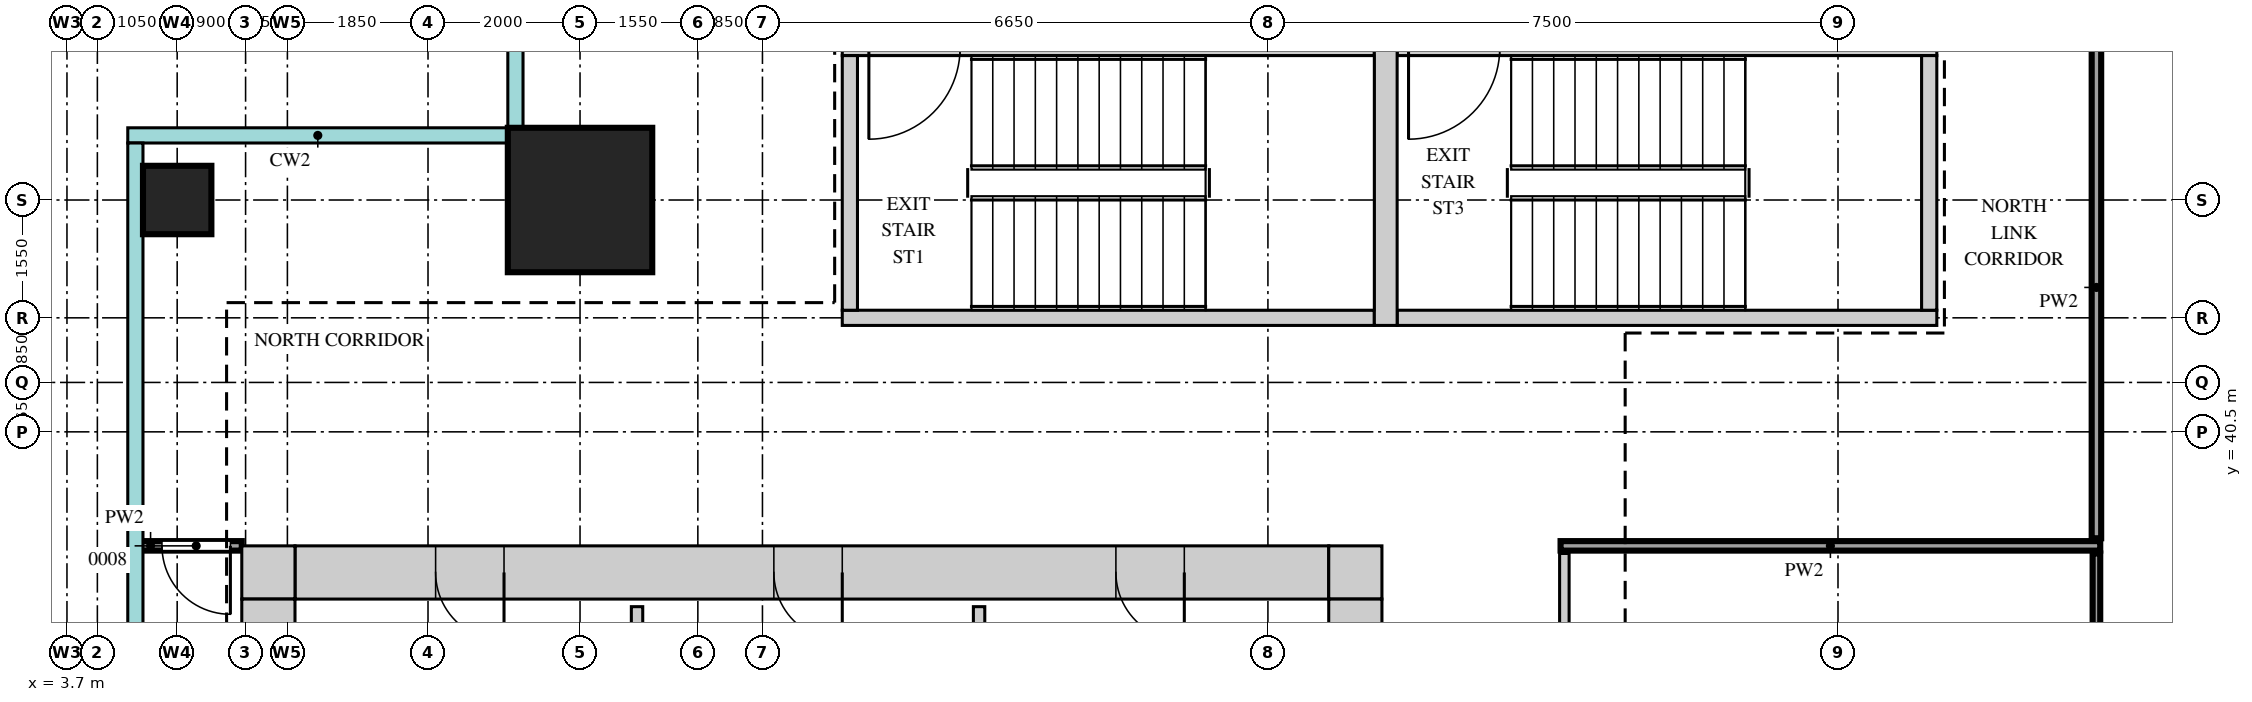
"""IFC4 building model, lengths in metres.
Left out: names, types, materials, properties, quantities, classifications, styles, units other than length and angle.
Written with IfcOpenShell. Run it as: python <this file> out.ifc"""

import sys

from ifc_helpers import new_model, si_unit, direction, frame, frame_2d, origin, origin_2d, place, context, subcontext, project, spatial, rectangle, extrude, source, transform, mapped, element, fill, save


model = new_model("IFC4")
c1 = context("Model", 3, precision=1e-05, world=origin(), true_north=direction((0.0, 1.0)))
c2 = subcontext(c1, "Body", "Model", "MODEL_VIEW")
j1 = project(units=[si_unit("LENGTHUNIT", "METRE"), si_unit("PLANEANGLEUNIT", "RADIAN")], contexts=[c1])
p1 = place(None, origin())
s1 = spatial("IfcSite", under=j1, at=p1, CompositionType="ELEMENT")
p2 = place(p1, origin())
s2 = spatial("IfcBuilding", under=s1, at=p2, CompositionType="ELEMENT")
p3 = place(p2, frame((0.0, 0.0, 238.2)))
s3 = spatial("IfcBuildingStorey", under=s2, at=p3, CompositionType="ELEMENT", Elevation=238.2)
m1 = source(origin(), c2, "Body", "SweptSolid", [
    extrude(rectangle(XDim=13.6, YDim=0.7, at=frame_2d((6.8, 0.0))), origin(), (0.0, 0.0, 1.0), 3.75),
])
p4 = place(p3, frame((6.7, 38.65, 0.0), z_axis=(0.0, 0.0, 1.0), x_axis=(1.0, 0.0, 0.0)))
e1 = element("IfcWall", 1, at=p4, inside=s3, PredefinedType="SHEAR", context=c2, shape_type="MappedRepresentation", body=[
    mapped(m1, transform((0.0, 0.0, 0.0))),
])
m2 = source(origin(), c2, "Body", "SweptSolid", [
    extrude(rectangle(XDim=0.9, YDim=2.1, at=frame_2d((0.45, 1.05))), frame((0.0, 0.36, 0.0), z_axis=(0.0, -1.0, 0.0), x_axis=(1.0, 0.0, 0.0)), (0.0, 0.0, 1.0), 0.72),
])
p5 = place(p4, frame((1.85, 0.0, 0.0)))
e2 = element("IfcOpeningElement", 2, at=p5, cuts=e1, PredefinedType="OPENING", context=c2, shape_type="MappedRepresentation", body=[
    mapped(m2, transform((0.0, 0.0, 0.0))),
])
p6 = place(p4, frame((6.3, 0.0, 0.0)))
e3 = element("IfcOpeningElement", 3, at=p6, cuts=e1, PredefinedType="OPENING", context=c2, shape_type="MappedRepresentation", body=[
    mapped(m2, transform((0.0, 0.0, 0.0))),
])
p7 = place(p4, frame((10.8, 0.0, 0.0)))
e4 = element("IfcOpeningElement", 4, at=p7, cuts=e1, PredefinedType="OPENING", context=c2, shape_type="MappedRepresentation", body=[
    mapped(m2, transform((0.0, 0.0, 0.0))),
])
m3 = source(origin(), c2, "Body", "SweptSolid", [
    extrude(rectangle(XDim=0.7, YDim=0.7, at=frame_2d((0.35, 0.0))), origin(), (0.0, 0.0, 1.0), 3.75),
])
for number, where, z_axis, x_axis in (
    (5, (20.3, 38.65, 0.0), (0.0, 0.0, 1.0), (1.0, 0.0, 0.0)),
    (6, (6.0, 38.65, 0.0), (0.0, 0.0, 1.0), (1.0, 0.0, 0.0)),
):
    element("IfcWall", number, at=place(p3, frame(where, z_axis=z_axis, x_axis=x_axis)), inside=s3, PredefinedType="SHEAR", context=c2, shape_type="MappedRepresentation", body=[
        mapped(m3, transform((0.0, 0.0, 0.0))),
    ])
m4 = source(origin(), c2, "Body", "SweptSolid", [
    extrude(rectangle(XDim=22.6, YDim=0.7, at=frame_2d((11.3, 0.0))), origin(), (0.0, 0.0, 1.0), 3.75),
])
p8 = place(p3, frame((20.65, 15.7, 0.0), z_axis=(0.0, 0.0, 1.0), x_axis=(0.0, 1.0, 0.0)))
e7 = element("IfcWall", 7, at=p8, inside=s3, PredefinedType="SHEAR", context=c2, shape_type="MappedRepresentation", body=[
    mapped(m4, transform((0.0, 0.0, 0.0))),
])
m5 = source(origin(), c2, "Body", "SweptSolid", [
    extrude(rectangle(XDim=1.8, YDim=2.1, at=frame_2d((0.9, 1.05))), frame((0.0, 0.36, 0.0), z_axis=(0.0, -1.0, 0.0), x_axis=(1.0, 0.0, 0.0)), (0.0, 0.0, 1.0), 0.72),
])
p9 = place(p8, frame((10.8, 0.0, 0.0)))
e8 = element("IfcOpeningElement", 8, at=p9, cuts=e7, PredefinedType="OPENING", context=c2, shape_type="MappedRepresentation", body=[
    mapped(m5, transform((0.0, 0.0, 0.0))),
])
p10 = place(p8, frame((0.45, 0.0, 0.0)))
e9 = element("IfcOpeningElement", 9, at=p10, cuts=e7, PredefinedType="OPENING", context=c2, shape_type="MappedRepresentation", body=[
    mapped(m2, transform((0.0, 0.0, 0.0))),
])
m6 = source(origin(), c2, "Body", "SweptSolid", [
    extrude(rectangle(XDim=1.0, YDim=2.1, at=frame_2d((0.5, 1.05))), frame((0.0, 0.36, 0.0), z_axis=(0.0, -1.0, 0.0), x_axis=(1.0, 0.0, 0.0)), (0.0, 0.0, 1.0), 0.72),
])
p11 = place(p8, frame((2.2, 0.0, 0.0)))
e10 = element("IfcOpeningElement", 10, at=p11, cuts=e7, PredefinedType="OPENING", context=c2, shape_type="MappedRepresentation", body=[
    mapped(m6, transform((0.0, 0.0, 0.0))),
])
p12 = place(p8, frame((5.0, 0.0, 0.0)))
e11 = element("IfcOpeningElement", 11, at=p12, cuts=e7, PredefinedType="OPENING", context=c2, shape_type="MappedRepresentation", body=[
    mapped(m2, transform((0.0, 0.0, 0.0))),
])
p13 = place(p3, frame((6.35, 15.7, 0.0), z_axis=(0.0, 0.0, 1.0), x_axis=(0.0, 1.0, 0.0)))
e12 = element("IfcWall", 12, at=p13, inside=s3, PredefinedType="SHEAR", context=c2, shape_type="MappedRepresentation", body=[
    mapped(m4, transform((0.0, 0.0, 0.0))),
])
m7 = source(origin(), c2, "Body", "SweptSolid", [
    extrude(rectangle(XDim=7.0, YDim=0.2, at=frame_2d((3.5, 0.0))), origin(), (0.0, 0.0, 1.0), 3.75),
])
p14 = place(p3, frame((13.9, 45.55, 0.0), z_axis=(0.0, 0.0, 1.0), x_axis=(1.0, 0.0, 0.0)))
e13 = element("IfcWall", 13, at=p14, inside=s3, PredefinedType="SHEAR", context=c2, shape_type="MappedRepresentation", body=[
    mapped(m7, transform((0.0, 0.0, 0.0))),
])
m8 = source(origin(), c2, "Body", "SweptSolid", [
    extrude(rectangle(XDim=1.2, YDim=2.1, at=frame_2d((0.6, 1.05))), frame((0.0, 0.11, 0.0), z_axis=(0.0, -1.0, 0.0), x_axis=(1.0, 0.0, 0.0)), (0.0, 0.0, 1.0), 0.22),
])
p15 = place(p14, frame((0.35, 0.0, 0.0)))
e14 = element("IfcOpeningElement", 14, at=p15, cuts=e13, PredefinedType="OPENING", context=c2, shape_type="MappedRepresentation", body=[
    mapped(m8, transform((0.0, 0.0, 0.0))),
])
p16 = place(p3, frame((13.9, 42.0, 0.0), z_axis=(0.0, 0.0, 1.0), x_axis=(1.0, 0.0, 0.0)))
e15 = element("IfcWall", 15, at=p16, inside=s3, PredefinedType="SHEAR", context=c2, shape_type="MappedRepresentation", body=[
    mapped(m7, transform((0.0, 0.0, 0.0))),
])
m9 = source(origin(), c2, "Body", "SweptSolid", [
    extrude(rectangle(XDim=7.1, YDim=0.2, at=frame_2d((3.55, 0.0))), origin(), (0.0, 0.0, 1.0), 3.75),
])
p17 = place(p3, frame((21.2, 45.55, 0.0), z_axis=(0.0, 0.0, 1.0), x_axis=(1.0, 0.0, 0.0)))
e16 = element("IfcWall", 16, at=p17, inside=s3, PredefinedType="SHEAR", context=c2, shape_type="MappedRepresentation", body=[
    mapped(m9, transform((0.0, 0.0, 0.0))),
])
p18 = place(p17, frame((0.15, 0.0, 0.0)))
e17 = element("IfcOpeningElement", 17, at=p18, cuts=e16, PredefinedType="OPENING", context=c2, shape_type="MappedRepresentation", body=[
    mapped(m8, transform((0.0, 0.0, 0.0))),
])
p19 = place(p3, frame((21.2, 42.0, 0.0), z_axis=(0.0, 0.0, 1.0), x_axis=(1.0, 0.0, 0.0)))
e18 = element("IfcWall", 18, at=p19, inside=s3, PredefinedType="SHEAR", context=c2, shape_type="MappedRepresentation", body=[
    mapped(m9, transform((0.0, 0.0, 0.0))),
])
m10 = source(origin(), c2, "Body", "SweptSolid", [
    extrude(rectangle(XDim=3.75, YDim=0.3, at=frame_2d((1.875, 0.0))), origin(), (0.0, 0.0, 1.0), 3.75),
])
p20 = place(p3, frame((21.05, 41.9, 0.0), z_axis=(0.0, 0.0, 1.0), x_axis=(0.0, 1.0, 0.0)))
e19 = element("IfcWall", 19, at=p20, inside=s3, PredefinedType="SHEAR", context=c2, shape_type="MappedRepresentation", body=[
    mapped(m10, transform((0.0, 0.0, 0.0))),
])
m11 = source(origin(), c2, "Body", "SweptSolid", [
    extrude(rectangle(XDim=3.35, YDim=0.2, at=frame_2d((1.675, 0.0))), origin(), (0.0, 0.0, 1.0), 3.75),
])
for number, where, z_axis, x_axis in (
    (20, (14.0, 42.1, 0.0), (0.0, 0.0, 1.0), (0.0, 1.0, 0.0)),
    (21, (28.2, 42.1, 0.0), (0.0, 0.0, 1.0), (0.0, 1.0, 0.0)),
):
    element("IfcWall", number, at=place(p3, frame(where, z_axis=z_axis, x_axis=x_axis)), inside=s3, PredefinedType="SHEAR", context=c2, shape_type="MappedRepresentation", body=[
        mapped(m11, transform((0.0, 0.0, 0.0))),
    ])
m12 = source(origin(), c2, "Body", "SweptSolid", [
    extrude(rectangle(XDim=1.9, YDim=1.9, at=origin_2d()), origin(), (0.0, 0.0, 1.0), 4.0),
])
p21 = place(p3, frame((10.45, 43.55, 0.0), z_axis=(0.0, 0.0, 1.0), x_axis=(1.0, 0.0, 0.0)))
e22 = element("IfcColumn", 22, at=p21, inside=s3, PredefinedType="COLUMN", context=c2, shape_type="MappedRepresentation", body=[
    mapped(m12, transform((0.0, 0.0, 0.0))),
])
m13 = source(origin(), c2, "Body", "SweptSolid", [
    extrude(rectangle(XDim=0.9, YDim=0.9, at=origin_2d()), origin(), (0.0, 0.0, 1.0), 3.75),
])
p22 = place(p3, frame((5.15, 43.55, 0.0), z_axis=(0.0, 0.0, 1.0), x_axis=(1.0, 0.0, 0.0)))
e23 = element("IfcColumn", 23, at=p22, inside=s3, PredefinedType="COLUMN", context=c2, shape_type="MappedRepresentation", body=[
    mapped(m13, transform((0.0, 0.0, 0.0))),
])
m14 = source(origin(), c2, "Body", "SweptSolid", [
    extrude(rectangle(XDim=11.4, YDim=0.125, at=frame_2d((5.7, 0.0))), origin(), (0.0, 0.0, 1.0), 3.8),
])
p23 = place(p3, frame((23.4, 27.5, 0.0), z_axis=(0.0, 0.0, 1.0), x_axis=(0.0, 1.0, 0.0)))
e24 = element("IfcWall", 24, at=p23, inside=s3, PredefinedType="PARTITIONING", context=c2, shape_type="MappedRepresentation", body=[
    mapped(m14, transform((0.0, 0.0, 0.0))),
])
m15 = source(origin(), c2, "Body", "SweptSolid", [
    extrude(rectangle(XDim=0.9, YDim=2.1, at=frame_2d((0.45, 1.05))), frame((0.0, 0.073, 0.0), z_axis=(0.0, -1.0, 0.0), x_axis=(1.0, 0.0, 0.0)), (0.0, 0.0, 1.0), 0.145),
])
p24 = place(p23, frame((5.4, 0.0, 0.0)))
e25 = element("IfcOpeningElement", 25, at=p24, cuts=e24, PredefinedType="OPENING", context=c2, shape_type="MappedRepresentation", body=[
    mapped(m15, transform((0.0, 0.0, 0.0))),
])
m16 = source(origin(), c2, "Body", "SweptSolid", [
    extrude(rectangle(XDim=11.4, YDim=0.1, at=frame_2d((5.7, 0.0))), origin(), (0.0, 0.0, 1.0), 3.8),
])
p25 = place(p3, frame((30.4, 27.5, 0.0), z_axis=(0.0, 0.0, 1.0), x_axis=(0.0, 1.0, 0.0)))
e26 = element("IfcWall", 26, at=p25, inside=s3, PredefinedType="PARTITIONING", context=c2, shape_type="MappedRepresentation", body=[
    mapped(m16, transform((0.0, 0.0, 0.0))),
])
m17 = source(origin(), c2, "Body", "SweptSolid", [
    extrude(rectangle(XDim=6.0, YDim=0.15, at=frame_2d((3.0, 0.0))), origin(), (0.0, 0.0, 1.0), 3.8),
])
for number, where, z_axis, x_axis in (
    (27, (11.2, 32.2, 0.0), (0.0, 0.0, 1.0), (0.0, 1.0, 0.0)),
    (28, (15.7, 32.2, 0.0), (0.0, 0.0, 1.0), (0.0, 1.0, 0.0)),
):
    element("IfcWall", number, at=place(p3, frame(where, z_axis=z_axis, x_axis=x_axis)), inside=s3, PredefinedType="PARTITIONING", context=c2, shape_type="MappedRepresentation", body=[
        mapped(m17, transform((0.0, 0.0, 0.0))),
    ])
m18 = source(origin(), c2, "Body", "SweptSolid", [
    extrude(rectangle(XDim=1.35, YDim=0.125, at=frame_2d((0.675, 0.0))), origin(), (0.0, 0.0, 1.0), 3.8),
])
p26 = place(p3, frame((4.65, 39.0, 0.0), z_axis=(0.0, 0.0, 1.0), x_axis=(1.0, 0.0, 0.0)))
e29 = element("IfcWall", 29, at=p26, inside=s3, PredefinedType="PARTITIONING", context=c2, shape_type="MappedRepresentation", body=[
    mapped(m18, transform((0.0, 0.0, 0.0))),
])
p27 = place(p26, frame((0.3, 0.0, 0.0)))
e30 = element("IfcOpeningElement", 30, at=p27, cuts=e29, PredefinedType="OPENING", context=c2, shape_type="MappedRepresentation", body=[
    mapped(m15, transform((0.0, 0.0, 0.0))),
])
m19 = source(origin(), c2, "Body", "SweptSolid", [
    extrude(rectangle(XDim=7.1, YDim=0.125, at=frame_2d((3.55, 0.0))), origin(), (0.0, 0.0, 1.0), 3.8),
])
p28 = place(p3, frame((23.35, 39.0, 0.0), z_axis=(0.0, 0.0, 1.0), x_axis=(1.0, 0.0, 0.0)))
e31 = element("IfcWall", 31, at=p28, inside=s3, PredefinedType="PARTITIONING", context=c2, shape_type="MappedRepresentation", body=[
    mapped(m19, transform((0.0, 0.0, 0.0))),
])
m20 = source(origin(), c2, "Body", "SweptSolid", [
    extrude(rectangle(XDim=6.6, YDim=0.125, at=frame_2d((3.3, 0.0))), origin(), (0.0, 0.0, 1.0), 3.8),
])
p29 = place(p3, frame((30.4, 39.1, 0.0), z_axis=(0.0, 0.0, 1.0), x_axis=(0.0, 1.0, 0.0)))
e32 = element("IfcWall", 32, at=p29, inside=s3, PredefinedType="PARTITIONING", context=c2, shape_type="MappedRepresentation", body=[
    mapped(m20, transform((0.0, 0.0, 0.0))),
])
m21 = source(origin(), c2, "Body", "SweptSolid", [
    extrude(rectangle(XDim=0.9, YDim=2.1, at=frame_2d((0.45, 1.05))), frame((0.0, 0.3, 0.0), z_axis=(0.0, -1.0, 0.0), x_axis=(1.0, 0.0, 0.0)), (0.0, 0.0, 1.0), 0.6),
])
p30 = place(p5, origin())
e33 = element("IfcDoor", 33, at=p30, inside=s3, OperationType="SINGLE_SWING_RIGHT", PredefinedType="DOOR", context=c2, shape_type="MappedRepresentation", body=[
    mapped(m21, transform((0.0, 0.0, 0.0))),
])
fill(e2, e33)
p31 = place(p6, origin())
e34 = element("IfcDoor", 34, at=p31, inside=s3, OperationType="SINGLE_SWING_RIGHT", PredefinedType="DOOR", context=c2, shape_type="MappedRepresentation", body=[
    mapped(m21, transform((0.0, 0.0, 0.0))),
])
fill(e3, e34)
p32 = place(p7, origin())
e35 = element("IfcDoor", 35, at=p32, inside=s3, OperationType="SINGLE_SWING_RIGHT", PredefinedType="DOOR", context=c2, shape_type="MappedRepresentation", body=[
    mapped(m21, transform((0.0, 0.0, 0.0))),
])
fill(e4, e35)
m22 = source(origin(), c2, "Body", "SweptSolid", [
    extrude(rectangle(XDim=0.9, YDim=2.1, at=frame_2d((0.45, 1.05))), frame((0.0, 0.025, 0.0), z_axis=(0.0, -1.0, 0.0), x_axis=(1.0, 0.0, 0.0)), (0.0, 0.0, 1.0), 0.05),
])
p33 = place(p27, origin())
e36 = element("IfcDoor", 36, at=p33, inside=s3, OperationType="SINGLE_SWING_RIGHT", PredefinedType="DOOR", context=c2, shape_type="MappedRepresentation", body=[
    mapped(m22, transform((0.0, 0.0, 0.0))),
])
fill(e30, e36)
save(model, sys.argv[1])
